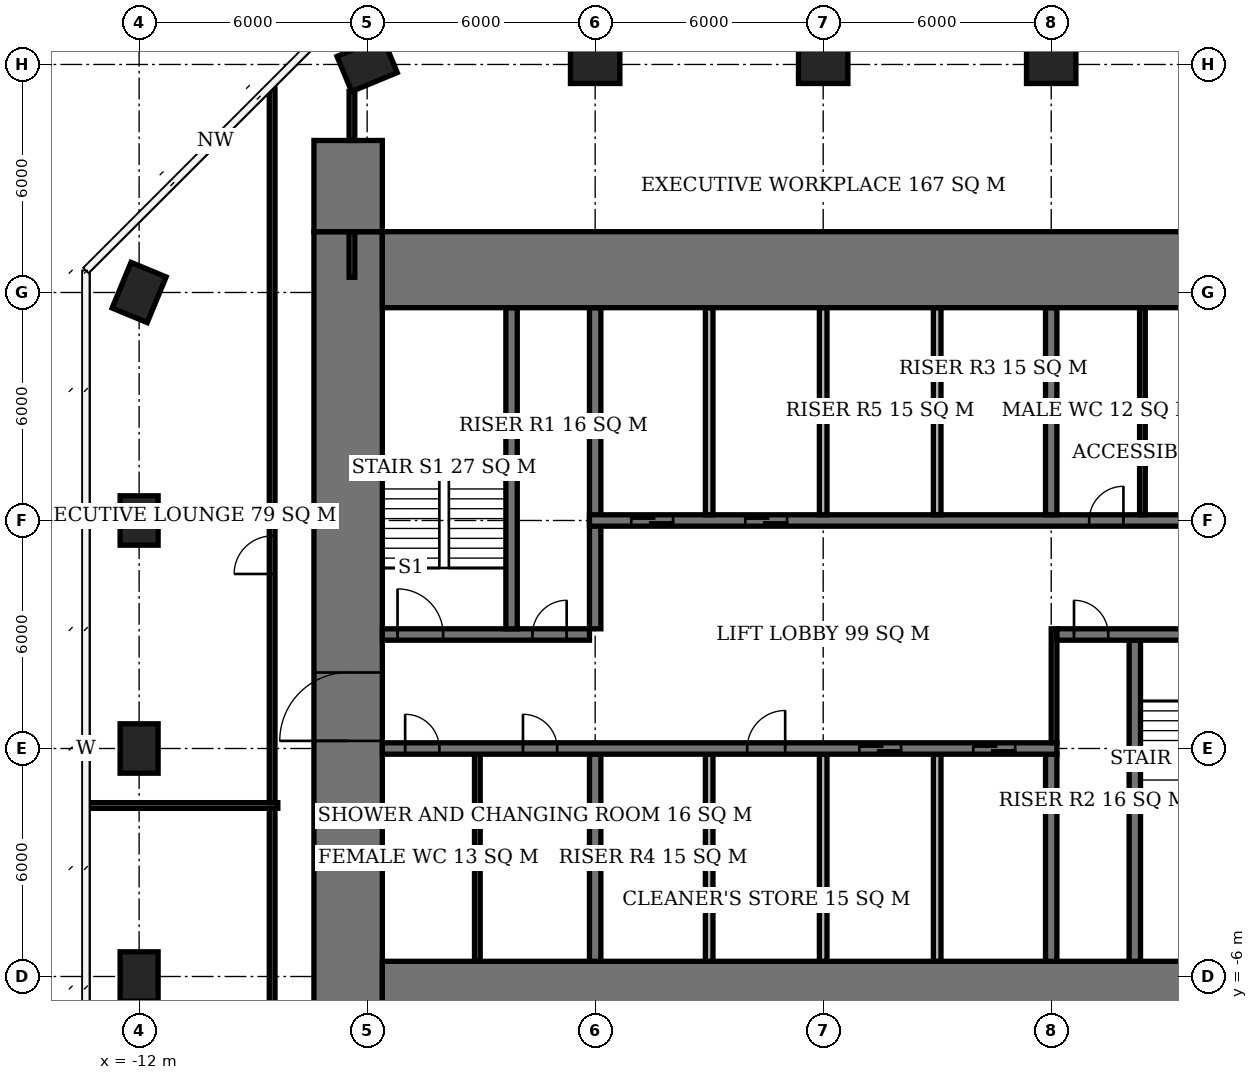
"""IFC4 building model, lengths in metres.
Left out: names, types, materials, properties, quantities, classifications, styles, units other than length and angle.
Written with IfcOpenShell. Run it as: python <this file> out.ifc"""

import sys

from ifc_helpers import new_model, si_unit, direction, frame, frame_2d, origin, origin_2d, place, context, subcontext, project, spatial, rectangle, extrude, element, fill, save


model = new_model("IFC4")
c1 = context("Model", 3, precision=1e-05, world=origin(), true_north=direction((0.0, 1.0)))
c2 = subcontext(c1, "Body", "Model", "MODEL_VIEW")
j1 = project(units=[si_unit("LENGTHUNIT", "METRE"), si_unit("PLANEANGLEUNIT", "RADIAN")], contexts=[c1])
p1 = place(None, origin())
s1 = spatial("IfcSite", under=j1, at=p1, CompositionType="ELEMENT")
p2 = place(p1, origin())
s2 = spatial("IfcBuilding", under=s1, at=p2, CompositionType="ELEMENT")
p3 = place(p2, frame((0.0, 0.0, 280.1)))
s3 = spatial("IfcBuildingStorey", under=s2, at=p3, CompositionType="ELEMENT", Elevation=280.1)
for number, where, z_axis, x_axis in (
    (1, (-12.0, -6.0, 0.0), (0.0, 0.0, 1.0), (0.0, 1.0, 0.0)),
    (2, (-12.0, 0.0, 0.0), (0.0, 0.0, 1.0), (0.0, 1.0, 0.0)),
    (3, (-12.0, 6.0, 0.0), (0.0, 0.0, 1.0), (0.0, 1.0, 0.0)),
    (4, (-12.0, 12.0, 0.0), (0.0, 0.0, 1.0), (0.383, 0.924, 0.0)),
    (5, (-6.0, 18.0, 0.0), (0.0, 0.0, 1.0), (0.924, 0.383, 0.0)),
    (6, (0.0, 18.0, 0.0), (0.0, 0.0, 1.0), (1.0, 0.0, 0.0)),
    (7, (6.0, 18.0, 0.0), (0.0, 0.0, 1.0), (1.0, 0.0, 0.0)),
    (8, (12.0, 18.0, 0.0), (0.0, 0.0, 1.0), (1.0, 0.0, 0.0)),
):
    element("IfcColumn", number, at=place(p3, frame(where, z_axis=z_axis, x_axis=x_axis)), inside=s3, PredefinedType="COLUMN", context=c2, shape_type="SweptSolid", body=[
        extrude(rectangle(XDim=1.3, YDim=1.0, at=origin_2d()), origin(), (0.0, 0.0, 1.0), 3.9),
    ])
for number, where, z_axis, x_axis in (
    (9, (-5.6, -6.6, 0.0), (0.0, 0.0, 1.0), (1.0, 0.0, 0.0)),
    (10, (-5.6, 12.6, 0.0), (0.0, 0.0, 1.0), (1.0, 0.0, 0.0)),
):
    element("IfcWall", number, at=place(p3, frame(where, z_axis=z_axis, x_axis=x_axis)), inside=s3, PredefinedType="SHEAR", context=c2, shape_type="SweptSolid", body=[
        extrude(rectangle(XDim=23.2, YDim=2.0, at=frame_2d((11.6, 0.0))), origin(), (0.0, 0.0, 1.0), 3.9),
    ])
p4 = place(p3, frame((-6.5, -7.6, 0.0), z_axis=(0.0, 0.0, 1.0), x_axis=(0.0, 1.0, 0.0)))
e11 = element("IfcWall", 11, at=p4, inside=s3, PredefinedType="SHEAR", context=c2, shape_type="SweptSolid", body=[
    extrude(rectangle(XDim=21.2, YDim=1.8, at=frame_2d((10.6, 0.0))), origin(), (0.0, 0.0, 1.0), 3.9),
])
p5 = place(p4, frame((7.8, 0.0, 0.0)))
e12 = element("IfcOpeningElement", 12, at=p5, cuts=e11, PredefinedType="OPENING", context=c2, shape_type="SweptSolid", body=[
    extrude(rectangle(XDim=1.8, YDim=2.4, at=frame_2d((0.9, 1.2))), frame((0.0, 0.91, 0.0), z_axis=(0.0, -1.0, 0.0), x_axis=(1.0, 0.0, 0.0)), (0.0, 0.0, 1.0), 1.82),
])
p6 = place(p3, frame((-6.5, 13.6, 0.0), z_axis=(0.0, 0.0, 1.0), x_axis=(0.0, 1.0, 0.0)))
e13 = element("IfcWall", 13, at=p6, inside=s3, PredefinedType="SHEAR", context=c2, shape_type="SweptSolid", body=[
    extrude(rectangle(XDim=2.4, YDim=1.8, at=frame_2d((1.2, 0.0))), origin(), (0.0, 0.0, 1.0), 3.9),
])
p7 = place(p3, frame((-5.6, 0.0, 0.0), z_axis=(0.0, 0.0, 1.0), x_axis=(1.0, 0.0, 0.0)))
e14 = element("IfcWall", 14, at=p7, inside=s3, PredefinedType="SHEAR", context=c2, shape_type="SweptSolid", body=[
    extrude(rectangle(XDim=17.75, YDim=0.3, at=frame_2d((8.875, 0.0))), origin(), (0.0, 0.0, 1.0), 3.9),
])
p8 = place(p7, frame((0.6, 0.0, 0.0)))
e15 = element("IfcOpeningElement", 15, at=p8, cuts=e14, PredefinedType="OPENING", context=c2, shape_type="SweptSolid", body=[
    extrude(rectangle(XDim=0.9, YDim=2.1, at=frame_2d((0.45, 1.05))), frame((0.0, 0.16, 0.0), z_axis=(0.0, -1.0, 0.0), x_axis=(1.0, 0.0, 0.0)), (0.0, 0.0, 1.0), 0.32),
])
p9 = place(p7, frame((3.7, 0.0, 0.0)))
e16 = element("IfcOpeningElement", 16, at=p9, cuts=e14, PredefinedType="OPENING", context=c2, shape_type="SweptSolid", body=[
    extrude(rectangle(XDim=0.9, YDim=2.1, at=frame_2d((0.45, 1.05))), frame((0.0, 0.16, 0.0), z_axis=(0.0, -1.0, 0.0), x_axis=(1.0, 0.0, 0.0)), (0.0, 0.0, 1.0), 0.32),
])
p10 = place(p7, frame((9.6, 0.0, 0.0)))
e17 = element("IfcOpeningElement", 17, at=p10, cuts=e14, PredefinedType="OPENING", context=c2, shape_type="SweptSolid", body=[
    extrude(rectangle(XDim=1.0, YDim=2.1, at=frame_2d((0.5, 1.05))), frame((0.0, 0.16, 0.0), z_axis=(0.0, -1.0, 0.0), x_axis=(1.0, 0.0, 0.0)), (0.0, 0.0, 1.0), 0.32),
])
p11 = place(p7, frame((12.55, 0.0, 0.0)))
e18 = element("IfcOpeningElement", 18, at=p11, cuts=e14, PredefinedType="OPENING", context=c2, shape_type="SweptSolid", body=[
    extrude(rectangle(XDim=1.1, YDim=2.1, at=frame_2d((0.55, 1.05))), frame((0.0, 0.16, 0.0), z_axis=(0.0, -1.0, 0.0), x_axis=(1.0, 0.0, 0.0)), (0.0, 0.0, 1.0), 0.32),
])
p12 = place(p7, frame((15.55, 0.0, 0.0)))
e19 = element("IfcOpeningElement", 19, at=p12, cuts=e14, PredefinedType="OPENING", context=c2, shape_type="SweptSolid", body=[
    extrude(rectangle(XDim=1.1, YDim=2.1, at=frame_2d((0.55, 1.05))), frame((0.0, 0.16, 0.0), z_axis=(0.0, -1.0, 0.0), x_axis=(1.0, 0.0, 0.0)), (0.0, 0.0, 1.0), 0.32),
])
p13 = place(p3, frame((-5.6, 3.0, 0.0), z_axis=(0.0, 0.0, 1.0), x_axis=(1.0, 0.0, 0.0)))
e20 = element("IfcWall", 20, at=p13, inside=s3, PredefinedType="SHEAR", context=c2, shape_type="SweptSolid", body=[
    extrude(rectangle(XDim=5.45, YDim=0.3, at=frame_2d((2.725, 0.0))), origin(), (0.0, 0.0, 1.0), 3.9),
])
p14 = place(p13, frame((0.4, 0.0, 0.0)))
e21 = element("IfcOpeningElement", 21, at=p14, cuts=e20, PredefinedType="OPENING", context=c2, shape_type="SweptSolid", body=[
    extrude(rectangle(XDim=1.2, YDim=2.1, at=frame_2d((0.6, 1.05))), frame((0.0, 0.16, 0.0), z_axis=(0.0, -1.0, 0.0), x_axis=(1.0, 0.0, 0.0)), (0.0, 0.0, 1.0), 0.32),
])
p15 = place(p13, frame((3.95, 0.0, 0.0)))
e22 = element("IfcOpeningElement", 22, at=p15, cuts=e20, PredefinedType="OPENING", context=c2, shape_type="SweptSolid", body=[
    extrude(rectangle(XDim=0.9, YDim=2.1, at=frame_2d((0.45, 1.05))), frame((0.0, 0.16, 0.0), z_axis=(0.0, -1.0, 0.0), x_axis=(1.0, 0.0, 0.0)), (0.0, 0.0, 1.0), 0.32),
])
p16 = place(p3, frame((12.15, 3.0, 0.0), z_axis=(0.0, 0.0, 1.0), x_axis=(1.0, 0.0, 0.0)))
e23 = element("IfcWall", 23, at=p16, inside=s3, PredefinedType="SHEAR", context=c2, shape_type="SweptSolid", body=[
    extrude(rectangle(XDim=5.45, YDim=0.3, at=frame_2d((2.725, 0.0))), origin(), (0.0, 0.0, 1.0), 3.9),
])
p17 = place(p16, frame((3.25, 0.0, 0.0)))
e24 = element("IfcOpeningElement", 24, at=p17, cuts=e23, PredefinedType="OPENING", context=c2, shape_type="SweptSolid", body=[
    extrude(rectangle(XDim=1.2, YDim=2.1, at=frame_2d((0.6, 1.05))), frame((0.0, 0.16, 0.0), z_axis=(0.0, -1.0, 0.0), x_axis=(1.0, 0.0, 0.0)), (0.0, 0.0, 1.0), 0.32),
])
p18 = place(p16, frame((0.45, 0.0, 0.0)))
e25 = element("IfcOpeningElement", 25, at=p18, cuts=e23, PredefinedType="OPENING", context=c2, shape_type="SweptSolid", body=[
    extrude(rectangle(XDim=0.9, YDim=2.1, at=frame_2d((0.45, 1.05))), frame((0.0, 0.16, 0.0), z_axis=(0.0, -1.0, 0.0), x_axis=(1.0, 0.0, 0.0)), (0.0, 0.0, 1.0), 0.32),
])
p19 = place(p3, frame((-0.15, 6.0, 0.0), z_axis=(0.0, 0.0, 1.0), x_axis=(1.0, 0.0, 0.0)))
e26 = element("IfcWall", 26, at=p19, inside=s3, PredefinedType="SHEAR", context=c2, shape_type="SweptSolid", body=[
    extrude(rectangle(XDim=17.75, YDim=0.3, at=frame_2d((8.875, 0.0))), origin(), (0.0, 0.0, 1.0), 3.9),
])
p20 = place(p19, frame((13.15, 0.0, 0.0)))
e27 = element("IfcOpeningElement", 27, at=p20, cuts=e26, PredefinedType="OPENING", context=c2, shape_type="SweptSolid", body=[
    extrude(rectangle(XDim=0.9, YDim=2.1, at=frame_2d((0.45, 1.05))), frame((0.0, 0.16, 0.0), z_axis=(0.0, -1.0, 0.0), x_axis=(1.0, 0.0, 0.0)), (0.0, 0.0, 1.0), 0.32),
])
p21 = place(p19, frame((16.25, 0.0, 0.0)))
e28 = element("IfcOpeningElement", 28, at=p21, cuts=e26, PredefinedType="OPENING", context=c2, shape_type="SweptSolid", body=[
    extrude(rectangle(XDim=1.0, YDim=2.1, at=frame_2d((0.5, 1.05))), frame((0.0, 0.16, 0.0), z_axis=(0.0, -1.0, 0.0), x_axis=(1.0, 0.0, 0.0)), (0.0, 0.0, 1.0), 0.32),
])
p22 = place(p19, frame((1.1, 0.0, 0.0)))
e29 = element("IfcOpeningElement", 29, at=p22, cuts=e26, PredefinedType="OPENING", context=c2, shape_type="SweptSolid", body=[
    extrude(rectangle(XDim=1.1, YDim=2.1, at=frame_2d((0.55, 1.05))), frame((0.0, 0.16, 0.0), z_axis=(0.0, -1.0, 0.0), x_axis=(1.0, 0.0, 0.0)), (0.0, 0.0, 1.0), 0.32),
])
p23 = place(p19, frame((4.1, 0.0, 0.0)))
e30 = element("IfcOpeningElement", 30, at=p23, cuts=e26, PredefinedType="OPENING", context=c2, shape_type="SweptSolid", body=[
    extrude(rectangle(XDim=1.1, YDim=2.1, at=frame_2d((0.55, 1.05))), frame((0.0, 0.16, 0.0), z_axis=(0.0, -1.0, 0.0), x_axis=(1.0, 0.0, 0.0)), (0.0, 0.0, 1.0), 0.32),
])
p24 = place(p3, frame((0.0, -5.6, 0.0), z_axis=(0.0, 0.0, 1.0), x_axis=(0.0, 1.0, 0.0)))
e31 = element("IfcWall", 31, at=p24, inside=s3, PredefinedType="SHEAR", context=c2, shape_type="SweptSolid", body=[
    extrude(rectangle(XDim=5.45, YDim=0.3, at=frame_2d((2.725, 0.0))), origin(), (0.0, 0.0, 1.0), 3.9),
])
p25 = place(p3, frame((0.0, 3.15, 0.0), z_axis=(0.0, 0.0, 1.0), x_axis=(0.0, 1.0, 0.0)))
e32 = element("IfcWall", 32, at=p25, inside=s3, PredefinedType="SHEAR", context=c2, shape_type="SweptSolid", body=[
    extrude(rectangle(XDim=8.45, YDim=0.3, at=frame_2d((4.225, 0.0))), origin(), (0.0, 0.0, 1.0), 3.9),
])
for number, where, z_axis, x_axis in (
    (33, (12.0, -5.6, 0.0), (0.0, 0.0, 1.0), (0.0, 1.0, 0.0)),
    (34, (12.0, 6.15, 0.0), (0.0, 0.0, 1.0), (0.0, 1.0, 0.0)),
):
    element("IfcWall", number, at=place(p3, frame(where, z_axis=z_axis, x_axis=x_axis)), inside=s3, PredefinedType="SHEAR", context=c2, shape_type="SweptSolid", body=[
        extrude(rectangle(XDim=5.45, YDim=0.3, at=frame_2d((2.725, 0.0))), origin(), (0.0, 0.0, 1.0), 3.9),
    ])
for number, where, z_axis, x_axis in (
    (35, (-2.2, 3.15, 0.0), (0.0, 0.0, 1.0), (0.0, 1.0, 0.0)),
    (36, (14.2, -5.6, 0.0), (0.0, 0.0, 1.0), (0.0, 1.0, 0.0)),
):
    element("IfcWall", number, at=place(p3, frame(where, z_axis=z_axis, x_axis=x_axis)), inside=s3, PredefinedType="SHEAR", context=c2, shape_type="SweptSolid", body=[
        extrude(rectangle(XDim=8.45, YDim=0.3, at=frame_2d((4.225, 0.0))), origin(), (0.0, 0.0, 1.0), 3.9),
    ])
for number, where, z_axis, x_axis in (
    (37, (3.0, 6.15, 0.0), (0.0, 0.0, 1.0), (0.0, 1.0, 0.0)),
    (38, (6.0, 6.15, 0.0), (0.0, 0.0, 1.0), (0.0, 1.0, 0.0)),
    (39, (9.0, 6.15, 0.0), (0.0, 0.0, 1.0), (0.0, 1.0, 0.0)),
    (40, (3.0, -5.6, 0.0), (0.0, 0.0, 1.0), (0.0, 1.0, 0.0)),
    (41, (6.0, -5.6, 0.0), (0.0, 0.0, 1.0), (0.0, 1.0, 0.0)),
    (42, (9.0, -5.6, 0.0), (0.0, 0.0, 1.0), (0.0, 1.0, 0.0)),
):
    element("IfcWall", number, at=place(p3, frame(where, z_axis=z_axis, x_axis=x_axis)), inside=s3, PredefinedType="SOLIDWALL", context=c2, shape_type="SweptSolid", body=[
        extrude(rectangle(XDim=5.45, YDim=0.2, at=frame_2d((2.725, 0.0))), origin(), (0.0, 0.0, 1.0), 3.9),
    ])
for number, where, z_axis, x_axis in (
    (43, (-3.1, -5.6, 0.0), (0.0, 0.0, 1.0), (0.0, 1.0, 0.0)),
    (44, (14.4, 6.15, 0.0), (0.0, 0.0, 1.0), (0.0, 1.0, 0.0)),
):
    element("IfcWall", number, at=place(p3, frame(where, z_axis=z_axis, x_axis=x_axis)), inside=s3, PredefinedType="PLUMBINGWALL", context=c2, shape_type="SweptSolid", body=[
        extrude(rectangle(XDim=5.45, YDim=0.15, at=frame_2d((2.725, 0.0))), origin(), (0.0, 0.0, 1.0), 3.65),
    ])
p26 = place(p3, frame((-13.375, -1.5, 0.0), z_axis=(0.0, 0.0, 1.0), x_axis=(1.0, 0.0, 0.0)))
e45 = element("IfcWall", 45, at=p26, inside=s3, PredefinedType="PARTITIONING", context=c2, shape_type="SweptSolid", body=[
    extrude(rectangle(XDim=5.025, YDim=0.15, at=frame_2d((2.512, 0.0))), origin(), (0.0, 0.0, 1.0), 3.65),
])
p27 = place(p3, frame((-8.5, -11.29, 0.0), z_axis=(0.0, 0.0, 1.0), x_axis=(0.0, 1.0, 0.0)))
e46 = element("IfcWall", 46, at=p27, inside=s3, PredefinedType="PARTITIONING", context=c2, shape_type="SweptSolid", body=[
    extrude(rectangle(XDim=9.715, YDim=0.15, at=frame_2d((4.857, 0.0))), origin(), (0.0, 0.0, 1.0), 3.65),
])
p28 = place(p27, frame((0.3, 0.0, 0.0)))
e47 = element("IfcOpeningElement", 47, at=p28, cuts=e46, PredefinedType="OPENING", context=c2, shape_type="SweptSolid", body=[
    extrude(rectangle(XDim=1.0, YDim=2.4, at=frame_2d((0.5, 1.2))), frame((0.0, 0.085, 0.0), z_axis=(0.0, -1.0, 0.0), x_axis=(1.0, 0.0, 0.0)), (0.0, 0.0, 1.0), 0.17),
])
p29 = place(p3, frame((-8.5, -1.425, 0.0), z_axis=(0.0, 0.0, 1.0), x_axis=(0.0, 1.0, 0.0)))
e48 = element("IfcWall", 48, at=p29, inside=s3, PredefinedType="PARTITIONING", context=c2, shape_type="SweptSolid", body=[
    extrude(rectangle(XDim=18.788, YDim=0.15, at=frame_2d((9.394, 0.0))), origin(), (0.0, 0.0, 1.0), 3.65),
])
p30 = place(p29, frame((6.018, 0.0, 0.0)))
e49 = element("IfcOpeningElement", 49, at=p30, cuts=e48, PredefinedType="OPENING", context=c2, shape_type="SweptSolid", body=[
    extrude(rectangle(XDim=1.0, YDim=2.4, at=frame_2d((0.5, 1.2))), frame((0.0, 0.085, 0.0), z_axis=(0.0, -1.0, 0.0), x_axis=(1.0, 0.0, 0.0)), (0.0, 0.0, 1.0), 0.17),
])
p31 = place(p3, frame((-6.4, 12.4, 0.0), z_axis=(0.0, 0.0, 1.0), x_axis=(0.0, 1.0, 0.0)))
e50 = element("IfcWall", 50, at=p31, inside=s3, PredefinedType="PARTITIONING", context=c2, shape_type="SweptSolid", body=[
    extrude(rectangle(XDim=1.2, YDim=0.15, at=frame_2d((0.6, 0.0))), origin(), (0.0, 0.0, 1.0), 3.65),
])
p32 = place(p3, frame((-6.4, 16.0, 0.0), z_axis=(0.0, 0.0, 1.0), x_axis=(0.0, 1.0, 0.0)))
e51 = element("IfcWall", 51, at=p32, inside=s3, PredefinedType="PARTITIONING", context=c2, shape_type="SweptSolid", body=[
    extrude(rectangle(XDim=1.289, YDim=0.15, at=frame_2d((0.645, 0.0))), origin(), (0.0, 0.0, 1.0), 3.65),
])
p33 = place(p3, frame((12.075, 0.15, 0.0), z_axis=(0.0, 0.0, 1.0), x_axis=(0.0, 1.0, 0.0)))
e52 = element("IfcWall", 52, at=p33, inside=s3, PredefinedType="PARTITIONING", context=c2, shape_type="SweptSolid", body=[
    extrude(rectangle(XDim=3.0, YDim=0.15, at=frame_2d((1.5, 0.0))), origin(), (0.0, 0.0, 1.0), 3.65),
])
p34 = place(p5, origin())
e53 = element("IfcDoor", 53, at=p34, inside=s3, OperationType="DOUBLE_DOOR_SINGLE_SWING", PredefinedType="DOOR", context=c2, shape_type="SweptSolid", body=[
    extrude(rectangle(XDim=1.8, YDim=2.4, at=frame_2d((0.9, 1.2))), frame((0.0, 0.025, 0.0), z_axis=(0.0, -1.0, 0.0), x_axis=(1.0, 0.0, 0.0)), (0.0, 0.0, 1.0), 0.05),
])
fill(e12, e53)
p35 = place(p14, origin())
e54 = element("IfcDoor", 54, at=p35, inside=s3, OperationType="SINGLE_SWING_LEFT", PredefinedType="DOOR", context=c2, shape_type="SweptSolid", body=[
    extrude(rectangle(XDim=1.2, YDim=2.1, at=frame_2d((0.6, 1.05))), frame((0.0, 0.025, 0.0), z_axis=(0.0, -1.0, 0.0), x_axis=(1.0, 0.0, 0.0)), (0.0, 0.0, 1.0), 0.05),
])
fill(e21, e54)
p36 = place(p15, origin())
e55 = element("IfcDoor", 55, at=p36, inside=s3, OperationType="SINGLE_SWING_RIGHT", PredefinedType="DOOR", context=c2, shape_type="SweptSolid", body=[
    extrude(rectangle(XDim=0.9, YDim=2.1, at=frame_2d((0.45, 1.05))), frame((0.0, 0.025, 0.0), z_axis=(0.0, -1.0, 0.0), x_axis=(1.0, 0.0, 0.0)), (0.0, 0.0, 1.0), 0.05),
])
fill(e22, e55)
p37 = place(p18, origin())
e56 = element("IfcDoor", 56, at=p37, inside=s3, OperationType="SINGLE_SWING_LEFT", PredefinedType="DOOR", context=c2, shape_type="SweptSolid", body=[
    extrude(rectangle(XDim=0.9, YDim=2.1, at=frame_2d((0.45, 1.05))), frame((0.0, 0.025, 0.0), z_axis=(0.0, -1.0, 0.0), x_axis=(1.0, 0.0, 0.0)), (0.0, 0.0, 1.0), 0.05),
])
fill(e25, e56)
p38 = place(p8, origin())
e57 = element("IfcDoor", 57, at=p38, inside=s3, OperationType="SINGLE_SWING_LEFT", PredefinedType="DOOR", context=c2, shape_type="SweptSolid", body=[
    extrude(rectangle(XDim=0.9, YDim=2.1, at=frame_2d((0.45, 1.05))), frame((0.0, 0.025, 0.0), z_axis=(0.0, -1.0, 0.0), x_axis=(1.0, 0.0, 0.0)), (0.0, 0.0, 1.0), 0.05),
])
fill(e15, e57)
p39 = place(p9, origin())
e58 = element("IfcDoor", 58, at=p39, inside=s3, OperationType="SINGLE_SWING_LEFT", PredefinedType="DOOR", context=c2, shape_type="SweptSolid", body=[
    extrude(rectangle(XDim=0.9, YDim=2.1, at=frame_2d((0.45, 1.05))), frame((0.0, 0.025, 0.0), z_axis=(0.0, -1.0, 0.0), x_axis=(1.0, 0.0, 0.0)), (0.0, 0.0, 1.0), 0.05),
])
fill(e16, e58)
p40 = place(p20, origin())
e59 = element("IfcDoor", 59, at=p40, inside=s3, OperationType="SINGLE_SWING_RIGHT", PredefinedType="DOOR", context=c2, shape_type="SweptSolid", body=[
    extrude(rectangle(XDim=0.9, YDim=2.1, at=frame_2d((0.45, 1.05))), frame((0.0, 0.025, 0.0), z_axis=(0.0, -1.0, 0.0), x_axis=(1.0, 0.0, 0.0)), (0.0, 0.0, 1.0), 0.05),
])
fill(e27, e59)
p41 = place(p10, origin())
e60 = element("IfcDoor", 60, at=p41, inside=s3, OperationType="SINGLE_SWING_RIGHT", PredefinedType="DOOR", context=c2, shape_type="SweptSolid", body=[
    extrude(rectangle(XDim=1.0, YDim=2.1, at=frame_2d((0.5, 1.05))), frame((0.0, 0.025, 0.0), z_axis=(0.0, -1.0, 0.0), x_axis=(1.0, 0.0, 0.0)), (0.0, 0.0, 1.0), 0.05),
])
fill(e17, e60)
p42 = place(p22, origin())
e61 = element("IfcDoor", 61, at=p42, inside=s3, OperationType="DOUBLE_DOOR_SLIDING", PredefinedType="USERDEFINED", context=c2, shape_type="SweptSolid", body=[
    extrude(rectangle(XDim=1.1, YDim=2.1, at=frame_2d((0.55, 1.05))), frame((0.0, 0.025, 0.0), z_axis=(0.0, -1.0, 0.0), x_axis=(1.0, 0.0, 0.0)), (0.0, 0.0, 1.0), 0.05),
])
fill(e29, e61)
p43 = place(p23, origin())
e62 = element("IfcDoor", 62, at=p43, inside=s3, OperationType="DOUBLE_DOOR_SLIDING", PredefinedType="USERDEFINED", context=c2, shape_type="SweptSolid", body=[
    extrude(rectangle(XDim=1.1, YDim=2.1, at=frame_2d((0.55, 1.05))), frame((0.0, 0.025, 0.0), z_axis=(0.0, -1.0, 0.0), x_axis=(1.0, 0.0, 0.0)), (0.0, 0.0, 1.0), 0.05),
])
fill(e30, e62)
p44 = place(p11, origin())
e63 = element("IfcDoor", 63, at=p44, inside=s3, OperationType="DOUBLE_DOOR_SLIDING", PredefinedType="USERDEFINED", context=c2, shape_type="SweptSolid", body=[
    extrude(rectangle(XDim=1.1, YDim=2.1, at=frame_2d((0.55, 1.05))), frame((0.0, 0.025, 0.0), z_axis=(0.0, -1.0, 0.0), x_axis=(1.0, 0.0, 0.0)), (0.0, 0.0, 1.0), 0.05),
])
fill(e18, e63)
p45 = place(p12, origin())
e64 = element("IfcDoor", 64, at=p45, inside=s3, OperationType="DOUBLE_DOOR_SLIDING", PredefinedType="USERDEFINED", context=c2, shape_type="SweptSolid", body=[
    extrude(rectangle(XDim=1.1, YDim=2.1, at=frame_2d((0.55, 1.05))), frame((0.0, 0.025, 0.0), z_axis=(0.0, -1.0, 0.0), x_axis=(1.0, 0.0, 0.0)), (0.0, 0.0, 1.0), 0.05),
])
fill(e19, e64)
p46 = place(p30, origin())
e65 = element("IfcDoor", 65, at=p46, inside=s3, OperationType="SINGLE_SWING_LEFT", PredefinedType="DOOR", context=c2, shape_type="SweptSolid", body=[
    extrude(rectangle(XDim=1.0, YDim=2.4, at=frame_2d((0.5, 1.2))), frame((0.0, 0.025, 0.0), z_axis=(0.0, -1.0, 0.0), x_axis=(1.0, 0.0, 0.0)), (0.0, 0.0, 1.0), 0.05),
])
fill(e49, e65)
save(model, sys.argv[1])
